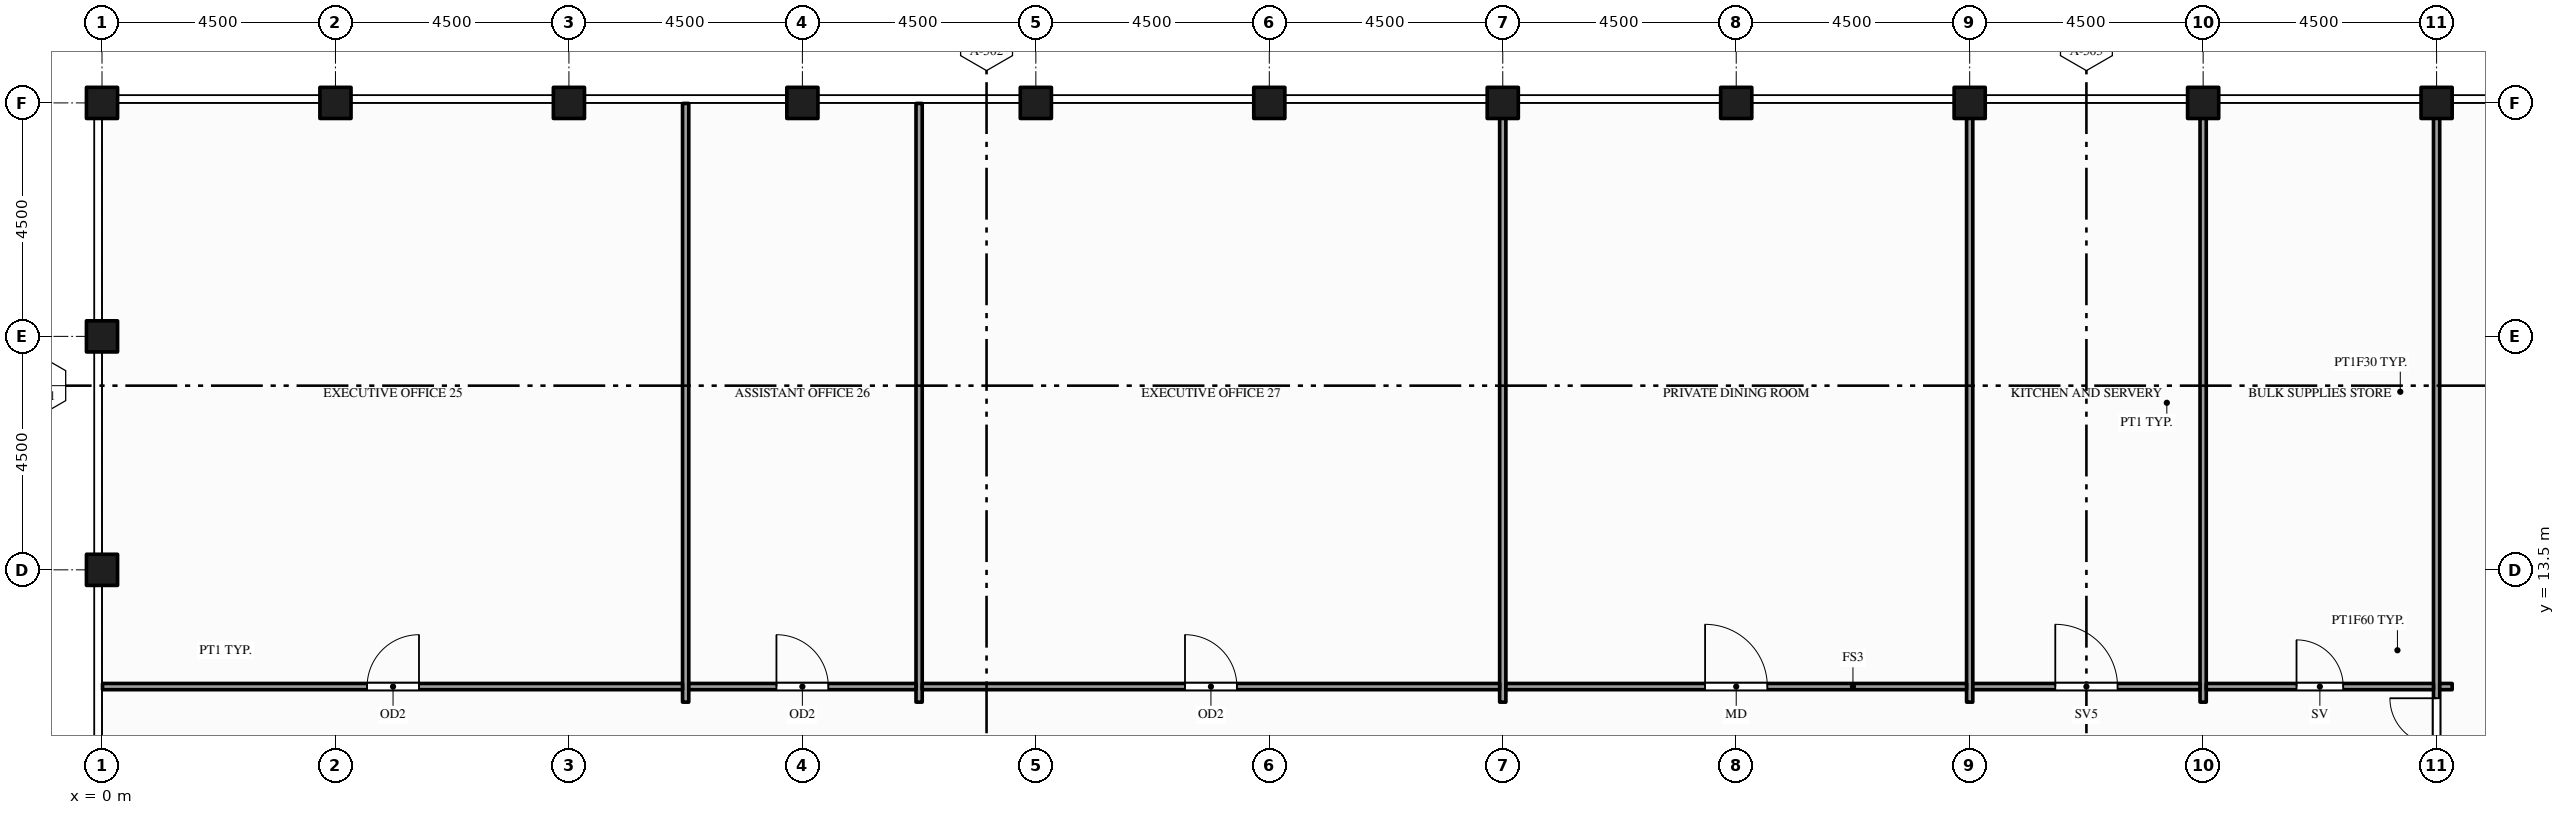
"""IFC4 building model, lengths in metres.
Left out: names, types, materials, properties, quantities, classifications, styles, units other than length and angle.
Written with IfcOpenShell. Run it as: python <this file> out.ifc"""

import sys

from ifc_helpers import new_model, si_unit, direction, frame, frame_2d, origin, origin_2d, place, context, subcontext, project, spatial, rectangle, hollow_rectangle, extrude, element, fill, save


model = new_model("IFC4")
c1 = context("Model", 3, precision=1e-05, world=origin(), true_north=direction((0.0, 1.0)))
c2 = subcontext(c1, "Body", "Model", "MODEL_VIEW")
j1 = project(units=[si_unit("LENGTHUNIT", "METRE"), si_unit("PLANEANGLEUNIT", "RADIAN")], contexts=[c1])
p1 = place(None, origin())
s1 = spatial("IfcSite", under=j1, at=p1, CompositionType="ELEMENT")
p2 = place(p1, origin())
s2 = spatial("IfcBuilding", under=s1, at=p2, CompositionType="ELEMENT")
p3 = place(p2, frame((0.0, 0.0, 309.5)))
s3 = spatial("IfcBuildingStorey", under=s2, at=p3, CompositionType="ELEMENT", Elevation=309.5)
for number, where, z_axis, x_axis in (
    (1, (0.0, 13.5, -0.15), (0.0, 0.0, 1.0), (1.0, 0.0, 0.0)),
    (2, (0.0, 18.0, -0.15), (0.0, 0.0, 1.0), (1.0, 0.0, 0.0)),
    (3, (0.0, 22.5, -0.15), (0.0, 0.0, 1.0), (1.0, 0.0, 0.0)),
    (4, (4.5, 22.5, -0.15), (0.0, 0.0, 1.0), (1.0, 0.0, 0.0)),
    (5, (9.0, 22.5, -0.15), (0.0, 0.0, 1.0), (1.0, 0.0, 0.0)),
    (6, (13.5, 22.5, -0.15), (0.0, 0.0, 1.0), (1.0, 0.0, 0.0)),
    (7, (18.0, 22.5, -0.15), (0.0, 0.0, 1.0), (1.0, 0.0, 0.0)),
    (8, (22.5, 22.5, -0.15), (0.0, 0.0, 1.0), (1.0, 0.0, 0.0)),
    (9, (27.0, 22.5, -0.15), (0.0, 0.0, 1.0), (1.0, 0.0, 0.0)),
    (10, (31.5, 22.5, -0.15), (0.0, 0.0, 1.0), (1.0, 0.0, 0.0)),
    (11, (36.0, 22.5, -0.15), (0.0, 0.0, 1.0), (1.0, 0.0, 0.0)),
    (12, (40.5, 22.5, -0.15), (0.0, 0.0, 1.0), (1.0, 0.0, 0.0)),
    (13, (45.0, 22.5, -0.15), (0.0, 0.0, 1.0), (1.0, 0.0, 0.0)),
):
    element("IfcColumn", number, at=place(p3, frame(where, z_axis=z_axis, x_axis=x_axis)), inside=s3, PredefinedType="COLUMN", context=c2, shape_type="SweptSolid", body=[
        extrude(hollow_rectangle(XDim=0.6, YDim=0.6, WallThickness=0.03, at=origin_2d()), origin(), (0.0, 0.0, 1.0), 4.5),
    ])
for number, where, z_axis, x_axis in (
    (14, (11.25, 10.95, 0.0), (0.0, 0.0, 1.0), (0.0, 1.0, 0.0)),
    (15, (15.75, 10.95, 0.0), (0.0, 0.0, 1.0), (0.0, 1.0, 0.0)),
    (16, (27.0, 10.95, 0.0), (0.0, 0.0, 1.0), (0.0, 1.0, 0.0)),
    (17, (36.0, 10.95, 0.0), (0.0, 0.0, 1.0), (0.0, 1.0, 0.0)),
    (18, (40.5, 10.95, 0.0), (0.0, 0.0, 1.0), (0.0, 1.0, 0.0)),
):
    element("IfcWall", number, at=place(p3, frame(where, z_axis=z_axis, x_axis=x_axis)), inside=s3, PredefinedType="PARTITIONING", context=c2, shape_type="SweptSolid", body=[
        extrude(rectangle(XDim=11.54, YDim=0.12, at=frame_2d((5.77, 0.0))), origin(), (0.0, 0.0, 1.0), 3.359),
    ])
p4 = place(p3, frame((45.0, 0.01, 0.0), z_axis=(0.0, 0.0, 1.0), x_axis=(0.0, 1.0, 0.0)))
e19 = element("IfcWall", 19, at=p4, inside=s3, PredefinedType="PARTITIONING", context=c2, shape_type="SweptSolid", body=[
    extrude(rectangle(XDim=22.48, YDim=0.12, at=frame_2d((11.24, 0.0))), origin(), (0.0, 0.0, 1.0), 3.359),
])
p5 = place(p4, frame((9.215, 0.0, 0.0)))
e20 = element("IfcOpeningElement", 20, at=p5, cuts=e19, PredefinedType="OPENING", context=c2, shape_type="SweptSolid", body=[
    extrude(rectangle(XDim=1.8, YDim=2.1, at=frame_2d((0.9, 1.05))), frame((0.0, 0.07, 0.0), z_axis=(0.0, -1.0, 0.0), x_axis=(1.0, 0.0, 0.0)), (0.0, 0.0, 1.0), 0.14),
])
p6 = place(p4, frame((0.99, 0.0, 0.0)))
e21 = element("IfcOpeningElement", 21, at=p6, cuts=e19, PredefinedType="OPENING", context=c2, shape_type="SweptSolid", body=[
    extrude(rectangle(XDim=0.9, YDim=2.1, at=frame_2d((0.45, 1.05))), frame((0.0, 0.07, 0.0), z_axis=(0.0, -1.0, 0.0), x_axis=(1.0, 0.0, 0.0)), (0.0, 0.0, 1.0), 0.14),
])
p7 = place(p4, frame((4.04, 0.0, 0.0)))
e22 = element("IfcOpeningElement", 22, at=p7, cuts=e19, PredefinedType="OPENING", context=c2, shape_type="SweptSolid", body=[
    extrude(rectangle(XDim=0.9, YDim=2.1, at=frame_2d((0.45, 1.05))), frame((0.0, 0.07, 0.0), z_axis=(0.0, -1.0, 0.0), x_axis=(1.0, 0.0, 0.0)), (0.0, 0.0, 1.0), 0.14),
])
p8 = place(p4, frame((6.99, 0.0, 0.0)))
e23 = element("IfcOpeningElement", 23, at=p8, cuts=e19, PredefinedType="OPENING", context=c2, shape_type="SweptSolid", body=[
    extrude(rectangle(XDim=1.0, YDim=2.1, at=frame_2d((0.5, 1.05))), frame((0.0, 0.07, 0.0), z_axis=(0.0, -1.0, 0.0), x_axis=(1.0, 0.0, 0.0)), (0.0, 0.0, 1.0), 0.14),
])
p9 = place(p3, frame((0.01, 11.25, 0.0), z_axis=(0.0, 0.0, 1.0), x_axis=(1.0, 0.0, 0.0)))
e24 = element("IfcWall", 24, at=p9, inside=s3, PredefinedType="PARTITIONING", context=c2, shape_type="SweptSolid", body=[
    extrude(rectangle(XDim=11.18, YDim=0.12, at=frame_2d((5.59, 0.0))), origin(), (0.0, 0.0, 1.0), 3.359),
])
p10 = place(p9, frame((5.1, 0.0, 0.0)))
e25 = element("IfcOpeningElement", 25, at=p10, cuts=e24, PredefinedType="OPENING", context=c2, shape_type="SweptSolid", body=[
    extrude(rectangle(XDim=1.0, YDim=2.1, at=frame_2d((0.5, 1.05))), frame((0.0, 0.07, 0.0), z_axis=(0.0, -1.0, 0.0), x_axis=(1.0, 0.0, 0.0)), (0.0, 0.0, 1.0), 0.14),
])
p11 = place(p3, frame((11.31, 11.25, 0.0), z_axis=(0.0, 0.0, 1.0), x_axis=(1.0, 0.0, 0.0)))
e26 = element("IfcWall", 26, at=p11, inside=s3, PredefinedType="PARTITIONING", context=c2, shape_type="SweptSolid", body=[
    extrude(rectangle(XDim=4.38, YDim=0.12, at=frame_2d((2.19, 0.0))), origin(), (0.0, 0.0, 1.0), 3.359),
])
p12 = place(p11, frame((1.69, 0.0, 0.0)))
e27 = element("IfcOpeningElement", 27, at=p12, cuts=e26, PredefinedType="OPENING", context=c2, shape_type="SweptSolid", body=[
    extrude(rectangle(XDim=1.0, YDim=2.1, at=frame_2d((0.5, 1.05))), frame((0.0, 0.07, 0.0), z_axis=(0.0, -1.0, 0.0), x_axis=(1.0, 0.0, 0.0)), (0.0, 0.0, 1.0), 0.14),
])
p13 = place(p3, frame((15.81, 11.25, 0.0), z_axis=(0.0, 0.0, 1.0), x_axis=(1.0, 0.0, 0.0)))
e28 = element("IfcWall", 28, at=p13, inside=s3, PredefinedType="PARTITIONING", context=c2, shape_type="SweptSolid", body=[
    extrude(rectangle(XDim=11.13, YDim=0.12, at=frame_2d((5.565, 0.0))), origin(), (0.0, 0.0, 1.0), 3.359),
])
p14 = place(p13, frame((5.065, 0.0, 0.0)))
e29 = element("IfcOpeningElement", 29, at=p14, cuts=e28, PredefinedType="OPENING", context=c2, shape_type="SweptSolid", body=[
    extrude(rectangle(XDim=1.0, YDim=2.1, at=frame_2d((0.5, 1.05))), frame((0.0, 0.07, 0.0), z_axis=(0.0, -1.0, 0.0), x_axis=(1.0, 0.0, 0.0)), (0.0, 0.0, 1.0), 0.14),
])
p15 = place(p3, frame((27.06, 11.25, 0.0), z_axis=(0.0, 0.0, 1.0), x_axis=(1.0, 0.0, 0.0)))
e30 = element("IfcWall", 30, at=p15, inside=s3, PredefinedType="PARTITIONING", context=c2, shape_type="SweptSolid", body=[
    extrude(rectangle(XDim=8.88, YDim=0.12, at=frame_2d((4.44, 0.0))), origin(), (0.0, 0.0, 1.0), 3.359),
])
p16 = place(p15, frame((3.84, 0.0, 0.0)))
e31 = element("IfcOpeningElement", 31, at=p16, cuts=e30, PredefinedType="OPENING", context=c2, shape_type="SweptSolid", body=[
    extrude(rectangle(XDim=1.2, YDim=2.1, at=frame_2d((0.6, 1.05))), frame((0.0, 0.07, 0.0), z_axis=(0.0, -1.0, 0.0), x_axis=(1.0, 0.0, 0.0)), (0.0, 0.0, 1.0), 0.14),
])
p17 = place(p3, frame((36.06, 11.25, 0.0), z_axis=(0.0, 0.0, 1.0), x_axis=(1.0, 0.0, 0.0)))
e32 = element("IfcWall", 32, at=p17, inside=s3, PredefinedType="PARTITIONING", context=c2, shape_type="SweptSolid", body=[
    extrude(rectangle(XDim=4.38, YDim=0.12, at=frame_2d((2.19, 0.0))), origin(), (0.0, 0.0, 1.0), 3.359),
])
p18 = place(p17, frame((1.59, 0.0, 0.0)))
e33 = element("IfcOpeningElement", 33, at=p18, cuts=e32, PredefinedType="OPENING", context=c2, shape_type="SweptSolid", body=[
    extrude(rectangle(XDim=1.2, YDim=2.1, at=frame_2d((0.6, 1.05))), frame((0.0, 0.07, 0.0), z_axis=(0.0, -1.0, 0.0), x_axis=(1.0, 0.0, 0.0)), (0.0, 0.0, 1.0), 0.14),
])
p19 = place(p3, frame((40.56, 11.25, 0.0), z_axis=(0.0, 0.0, 1.0), x_axis=(1.0, 0.0, 0.0)))
e34 = element("IfcWall", 34, at=p19, inside=s3, PredefinedType="PARTITIONING", context=c2, shape_type="SweptSolid", body=[
    extrude(rectangle(XDim=4.38, YDim=0.12, at=frame_2d((2.19, 0.0))), origin(), (0.0, 0.0, 1.0), 3.359),
])
p20 = place(p19, frame((1.74, 0.0, 0.0)))
e35 = element("IfcOpeningElement", 35, at=p20, cuts=e34, PredefinedType="OPENING", context=c2, shape_type="SweptSolid", body=[
    extrude(rectangle(XDim=0.9, YDim=2.1, at=frame_2d((0.45, 1.05))), frame((0.0, 0.07, 0.0), z_axis=(0.0, -1.0, 0.0), x_axis=(1.0, 0.0, 0.0)), (0.0, 0.0, 1.0), 0.14),
])
p21 = place(p3, frame((45.06, 11.25, 0.0), z_axis=(0.0, 0.0, 1.0), x_axis=(1.0, 0.0, 0.0)))
e36 = element("IfcWall", 36, at=p21, inside=s3, PredefinedType="PARTITIONING", context=c2, shape_type="SweptSolid", body=[
    extrude(rectangle(XDim=0.24, YDim=0.12, at=frame_2d((0.12, 0.0))), origin(), (0.0, 0.0, 1.0), 3.359),
])
p22 = place(p5, origin())
e37 = element("IfcDoor", 37, at=p22, inside=s3, OperationType="DOUBLE_DOOR_SINGLE_SWING", PredefinedType="DOOR", context=c2, shape_type="SweptSolid", body=[
    extrude(rectangle(XDim=1.8, YDim=2.1, at=frame_2d((0.9, 1.05))), frame((0.0, 0.025, 0.0), z_axis=(0.0, -1.0, 0.0), x_axis=(1.0, 0.0, 0.0)), (0.0, 0.0, 1.0), 0.05),
])
fill(e20, e37)
p23 = place(p10, origin())
e38 = element("IfcDoor", 38, at=p23, inside=s3, OperationType="SINGLE_SWING_RIGHT", PredefinedType="DOOR", context=c2, shape_type="SweptSolid", body=[
    extrude(rectangle(XDim=1.0, YDim=2.1, at=frame_2d((0.5, 1.05))), frame((0.0, 0.025, 0.0), z_axis=(0.0, -1.0, 0.0), x_axis=(1.0, 0.0, 0.0)), (0.0, 0.0, 1.0), 0.05),
])
fill(e25, e38)
p24 = place(p12, origin())
e39 = element("IfcDoor", 39, at=p24, inside=s3, OperationType="SINGLE_SWING_LEFT", PredefinedType="DOOR", context=c2, shape_type="SweptSolid", body=[
    extrude(rectangle(XDim=1.0, YDim=2.1, at=frame_2d((0.5, 1.05))), frame((0.0, 0.025, 0.0), z_axis=(0.0, -1.0, 0.0), x_axis=(1.0, 0.0, 0.0)), (0.0, 0.0, 1.0), 0.05),
])
fill(e27, e39)
p25 = place(p14, origin())
e40 = element("IfcDoor", 40, at=p25, inside=s3, OperationType="SINGLE_SWING_LEFT", PredefinedType="DOOR", context=c2, shape_type="SweptSolid", body=[
    extrude(rectangle(XDim=1.0, YDim=2.1, at=frame_2d((0.5, 1.05))), frame((0.0, 0.025, 0.0), z_axis=(0.0, -1.0, 0.0), x_axis=(1.0, 0.0, 0.0)), (0.0, 0.0, 1.0), 0.05),
])
fill(e29, e40)
p26 = place(p16, origin())
e41 = element("IfcDoor", 41, at=p26, inside=s3, OperationType="SINGLE_SWING_LEFT", PredefinedType="DOOR", context=c2, shape_type="SweptSolid", body=[
    extrude(rectangle(XDim=1.2, YDim=2.1, at=frame_2d((0.6, 1.05))), frame((0.0, 0.025, 0.0), z_axis=(0.0, -1.0, 0.0), x_axis=(1.0, 0.0, 0.0)), (0.0, 0.0, 1.0), 0.05),
])
fill(e31, e41)
p27 = place(p18, origin())
e42 = element("IfcDoor", 42, at=p27, inside=s3, OperationType="SINGLE_SWING_LEFT", PredefinedType="DOOR", context=c2, shape_type="SweptSolid", body=[
    extrude(rectangle(XDim=1.2, YDim=2.1, at=frame_2d((0.6, 1.05))), frame((0.0, 0.025, 0.0), z_axis=(0.0, -1.0, 0.0), x_axis=(1.0, 0.0, 0.0)), (0.0, 0.0, 1.0), 0.05),
])
fill(e33, e42)
p28 = place(p20, origin())
e43 = element("IfcDoor", 43, at=p28, inside=s3, OperationType="SINGLE_SWING_LEFT", PredefinedType="DOOR", context=c2, shape_type="SweptSolid", body=[
    extrude(rectangle(XDim=0.9, YDim=2.1, at=frame_2d((0.45, 1.05))), frame((0.0, 0.025, 0.0), z_axis=(0.0, -1.0, 0.0), x_axis=(1.0, 0.0, 0.0)), (0.0, 0.0, 1.0), 0.05),
])
fill(e35, e43)
save(model, sys.argv[1])
